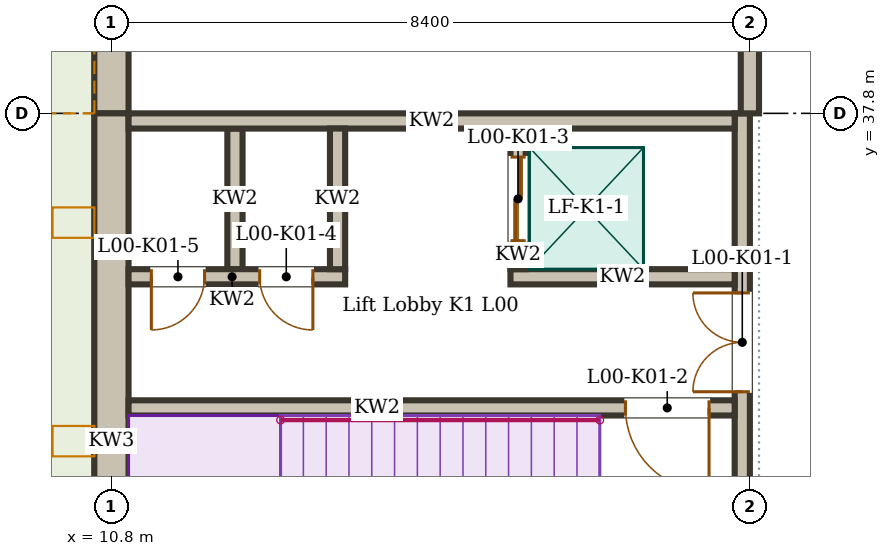
"""IFC4 building model, lengths in metres.
Left out: names, types, materials, properties, quantities, classifications, styles, units other than length and angle.
Written with IfcOpenShell. Run it as: python <this file> out.ifc"""

import sys

from ifc_helpers import new_model, si_unit, direction, frame, frame_2d, origin, place, context, subcontext, project, spatial, rectangle, extrude, element, fill, save


model = new_model("IFC4")
c1 = context("Model", 3, precision=1e-05, world=origin(), true_north=direction((0.0, 1.0)))
c2 = subcontext(c1, "Body", "Model", "MODEL_VIEW")
j1 = project(units=[si_unit("LENGTHUNIT", "METRE"), si_unit("PLANEANGLEUNIT", "RADIAN")], contexts=[c1])
p1 = place(None, origin())
s1 = spatial("IfcSite", under=j1, at=p1, CompositionType="ELEMENT")
p2 = place(p1, origin())
s2 = spatial("IfcBuilding", under=s1, at=p2, CompositionType="ELEMENT")
p3 = place(p2, origin())
s3 = spatial("IfcBuildingStorey", under=s2, at=p3, CompositionType="ELEMENT", Elevation=0.0)
p4 = place(p3, frame((10.8, 37.8, 0.0), z_axis=(0.0, 0.0, 1.0), x_axis=(0.0, 1.0, 0.0)))
e1 = element("IfcWall", 1, at=p4, inside=s3, PredefinedType="SOLIDWALL", context=c2, shape_type="SweptSolid", body=[
    extrude(rectangle(XDim=8.255, YDim=0.45, at=frame_2d((4.127, 0.0))), origin(), (0.0, 0.0, 1.0), 3.85),
])
p5 = place(p4, frame((1.1, 0.0, 2.1)))
e2 = element("IfcOpeningElement", 2, at=p5, cuts=e1, PredefinedType="OPENING", context=c2, shape_type="SweptSolid", body=[
    extrude(rectangle(XDim=0.6, YDim=1.2, at=frame_2d((0.3, 0.6))), frame((0.0, 0.235, 0.0), z_axis=(0.0, -1.0, 0.0), x_axis=(1.0, 0.0, 0.0)), (0.0, 0.0, 1.0), 0.47),
])
p6 = place(p4, frame((3.9, 0.0, 2.1)))
e3 = element("IfcOpeningElement", 3, at=p6, cuts=e1, PredefinedType="OPENING", context=c2, shape_type="SweptSolid", body=[
    extrude(rectangle(XDim=0.6, YDim=1.2, at=frame_2d((0.3, 0.6))), frame((0.0, 0.235, 0.0), z_axis=(0.0, -1.0, 0.0), x_axis=(1.0, 0.0, 0.0)), (0.0, 0.0, 1.0), 0.47),
])
p7 = place(p4, frame((6.7, 0.0, 2.1)))
e4 = element("IfcOpeningElement", 4, at=p7, cuts=e1, PredefinedType="OPENING", context=c2, shape_type="SweptSolid", body=[
    extrude(rectangle(XDim=0.6, YDim=1.2, at=frame_2d((0.3, 0.6))), frame((0.0, 0.235, 0.0), z_axis=(0.0, -1.0, 0.0), x_axis=(1.0, 0.0, 0.0)), (0.0, 0.0, 1.0), 0.47),
])
p8 = place(p3, frame((10.64, 37.8, 3.87), z_axis=(0.0, 0.0, 1.0), x_axis=(0.0, 1.0, 0.0)))
e5 = element("IfcWall", 5, at=p8, inside=s3, PredefinedType="SOLIDWALL", context=c2, shape_type="SweptSolid", body=[
    extrude(rectangle(XDim=8.4, YDim=0.13, at=frame_2d((4.2, 0.0))), origin(), (0.0, 0.0, 1.0), 0.63),
])
p9 = place(p3, frame((19.2, 37.8, 0.0), z_axis=(0.0, 0.0, 1.0), x_axis=(0.0, 1.0, 0.0)))
e6 = element("IfcWall", 6, at=p9, inside=s3, PredefinedType="SOLIDWALL", context=c2, shape_type="SweptSolid", body=[
    extrude(rectangle(XDim=5.48, YDim=0.24, at=frame_2d((2.74, 0.0))), origin(), (0.0, 0.0, 1.0), 3.8),
])
p10 = place(p9, frame((2.2, 0.0, 0.0)))
e7 = element("IfcOpeningElement", 7, at=p10, cuts=e6, PredefinedType="OPENING", context=c2, shape_type="SweptSolid", body=[
    extrude(rectangle(XDim=1.2, YDim=2.1, at=frame_2d((0.6, 1.05))), frame((0.0, 0.13, 0.0), z_axis=(0.0, -1.0, 0.0), x_axis=(1.0, 0.0, 0.0)), (0.0, 0.0, 1.0), 0.26),
])
p11 = place(p3, frame((19.1, 29.625, 0.0), z_axis=(0.0, 0.0, 1.0), x_axis=(0.0, 1.0, 0.0)))
e8 = element("IfcWall", 8, at=p11, inside=s3, PredefinedType="SOLIDWALL", context=c2, shape_type="SweptSolid", body=[
    extrude(rectangle(XDim=8.175, YDim=0.2, at=frame_2d((4.087, 0.0))), origin(), (0.0, 0.0, 1.0), 4.5),
])
p12 = place(p11, frame((4.512, 0.0, 0.0)))
e9 = element("IfcOpeningElement", 9, at=p12, cuts=e8, PredefinedType="OPENING", context=c2, shape_type="SweptSolid", body=[
    extrude(rectangle(XDim=1.3, YDim=2.1, at=frame_2d((0.65, 1.05))), frame((0.0, 0.11, 0.0), z_axis=(0.0, -1.0, 0.0), x_axis=(1.0, 0.0, 0.0)), (0.0, 0.0, 1.0), 0.22),
])
p13 = place(p3, frame((10.8, 29.175, 0.0), z_axis=(0.0, 0.0, 1.0), x_axis=(0.0, 1.0, 0.0)))
e10 = element("IfcWall", 10, at=p13, inside=s3, PredefinedType="SOLIDWALL", context=c2, shape_type="SweptSolid", body=[
    extrude(rectangle(XDim=8.625, YDim=0.45, at=frame_2d((4.312, 0.0))), origin(), (0.0, 0.0, 1.0), 4.5),
])
p14 = place(p3, frame((19.0, 37.7, 0.0), z_axis=(0.0, 0.0, 1.0), x_axis=(-1.0, 0.0, 0.0)))
e11 = element("IfcWall", 11, at=p14, inside=s3, PredefinedType="SOLIDWALL", context=c2, shape_type="SweptSolid", body=[
    extrude(rectangle(XDim=7.975, YDim=0.2, at=frame_2d((3.988, 0.0))), origin(), (0.0, 0.0, 1.0), 4.5),
])
p15 = place(p3, frame((19.0, 33.925, 0.0), z_axis=(0.0, 0.0, 1.0), x_axis=(-1.0, 0.0, 0.0)))
e12 = element("IfcWall", 12, at=p15, inside=s3, PredefinedType="SOLIDWALL", context=c2, shape_type="SweptSolid", body=[
    extrude(rectangle(XDim=7.975, YDim=0.2, at=frame_2d((3.988, 0.0))), origin(), (0.0, 0.0, 1.0), 4.5),
])
p16 = place(p15, frame((0.337, 0.0, 0.0)))
e13 = element("IfcOpeningElement", 13, at=p16, cuts=e12, PredefinedType="OPENING", context=c2, shape_type="SweptSolid", body=[
    extrude(rectangle(XDim=1.1, YDim=2.1, at=frame_2d((0.55, 1.05))), frame((0.0, 0.11, 0.0), z_axis=(0.0, -1.0, 0.0), x_axis=(1.0, 0.0, 0.0)), (0.0, 0.0, 1.0), 0.22),
])
p17 = place(p3, frame((19.0, 35.65, 0.0), z_axis=(0.0, 0.0, 1.0), x_axis=(-1.0, 0.0, 0.0)))
e14 = element("IfcWall", 14, at=p17, inside=s3, PredefinedType="SOLIDWALL", context=c2, shape_type="SweptSolid", body=[
    extrude(rectangle(XDim=2.95, YDim=0.2, at=frame_2d((1.475, 0.0))), origin(), (0.0, 0.0, 1.0), 4.5),
])
p18 = place(p3, frame((13.875, 35.65, 0.0), z_axis=(0.0, 0.0, 1.0), x_axis=(-1.0, 0.0, 0.0)))
e15 = element("IfcWall", 15, at=p18, inside=s3, PredefinedType="SOLIDWALL", context=c2, shape_type="SweptSolid", body=[
    extrude(rectangle(XDim=2.85, YDim=0.2, at=frame_2d((1.425, 0.0))), origin(), (0.0, 0.0, 1.0), 4.35),
])
p19 = place(p18, frame((0.425, 0.0, 0.0)))
e16 = element("IfcOpeningElement", 16, at=p19, cuts=e15, PredefinedType="OPENING", context=c2, shape_type="SweptSolid", body=[
    extrude(rectangle(XDim=0.7, YDim=2.1, at=frame_2d((0.35, 1.05))), frame((0.0, 0.11, 0.0), z_axis=(0.0, -1.0, 0.0), x_axis=(1.0, 0.0, 0.0)), (0.0, 0.0, 1.0), 0.22),
])
p20 = place(p18, frame((1.85, 0.0, 0.0)))
e17 = element("IfcOpeningElement", 17, at=p20, cuts=e15, PredefinedType="OPENING", context=c2, shape_type="SweptSolid", body=[
    extrude(rectangle(XDim=0.7, YDim=2.1, at=frame_2d((0.35, 1.05))), frame((0.0, 0.11, 0.0), z_axis=(0.0, -1.0, 0.0), x_axis=(1.0, 0.0, 0.0)), (0.0, 0.0, 1.0), 0.22),
])
p21 = place(p3, frame((16.15, 35.75, 0.0), z_axis=(0.0, 0.0, 1.0), x_axis=(0.0, 1.0, 0.0)))
e18 = element("IfcWall", 18, at=p21, inside=s3, PredefinedType="SOLIDWALL", context=c2, shape_type="SweptSolid", body=[
    extrude(rectangle(XDim=1.85, YDim=0.2, at=frame_2d((0.925, 0.0))), origin(), (0.0, 0.0, 1.0), 4.5),
])
p22 = place(p21, frame((0.375, 0.0, 0.0)))
e19 = element("IfcOpeningElement", 19, at=p22, cuts=e18, PredefinedType="OPENING", context=c2, shape_type="SweptSolid", body=[
    extrude(rectangle(XDim=1.1, YDim=2.1, at=frame_2d((0.55, 1.05))), frame((0.0, 0.11, 0.0), z_axis=(0.0, -1.0, 0.0), x_axis=(1.0, 0.0, 0.0)), (0.0, 0.0, 1.0), 0.22),
])
for number, where, z_axis, x_axis in (
    (20, (13.775, 35.75, 0.0), (0.0, 0.0, 1.0), (0.0, 1.0, 0.0)),
    (21, (12.425, 35.75, 0.0), (0.0, 0.0, 1.0), (0.0, 1.0, 0.0)),
):
    element("IfcWall", number, at=place(p3, frame(where, z_axis=z_axis, x_axis=x_axis)), inside=s3, PredefinedType="SOLIDWALL", context=c2, shape_type="SweptSolid", body=[
        extrude(rectangle(XDim=1.85, YDim=0.2, at=frame_2d((0.925, 0.0))), origin(), (0.0, 0.0, 1.0), 4.35),
    ])
p23 = place(p12, origin())
e22 = element("IfcDoor", 22, at=p23, inside=s3, OperationType="DOUBLE_DOOR_DOUBLE_SWING", PredefinedType="DOOR", context=c2, shape_type="SweptSolid", body=[
    extrude(rectangle(XDim=1.3, YDim=2.1, at=frame_2d((0.65, 1.05))), frame((0.0, 0.025, 0.0), z_axis=(0.0, -1.0, 0.0), x_axis=(1.0, 0.0, 0.0)), (0.0, 0.0, 1.0), 0.05),
])
fill(e9, e22)
p24 = place(p16, origin())
e23 = element("IfcDoor", 23, at=p24, inside=s3, OperationType="SINGLE_SWING_LEFT", PredefinedType="DOOR", context=c2, shape_type="SweptSolid", body=[
    extrude(rectangle(XDim=1.1, YDim=2.1, at=frame_2d((0.55, 1.05))), frame((0.0, 0.025, 0.0), z_axis=(0.0, -1.0, 0.0), x_axis=(1.0, 0.0, 0.0)), (0.0, 0.0, 1.0), 0.05),
])
fill(e13, e23)
p25 = place(p22, origin())
e24 = element("IfcDoor", 24, at=p25, inside=s3, OperationType="DOUBLE_DOOR_SLIDING", PredefinedType="DOOR", context=c2, shape_type="SweptSolid", body=[
    extrude(rectangle(XDim=1.1, YDim=2.1, at=frame_2d((0.55, 1.05))), frame((0.0, 0.025, 0.0), z_axis=(0.0, -1.0, 0.0), x_axis=(1.0, 0.0, 0.0)), (0.0, 0.0, 1.0), 0.05),
])
fill(e19, e24)
p26 = place(p19, origin())
e25 = element("IfcDoor", 25, at=p26, inside=s3, OperationType="SINGLE_SWING_LEFT", PredefinedType="DOOR", context=c2, shape_type="SweptSolid", body=[
    extrude(rectangle(XDim=0.7, YDim=2.1, at=frame_2d((0.35, 1.05))), frame((0.0, 0.025, 0.0), z_axis=(0.0, -1.0, 0.0), x_axis=(1.0, 0.0, 0.0)), (0.0, 0.0, 1.0), 0.05),
])
fill(e16, e25)
p27 = place(p20, origin())
e26 = element("IfcDoor", 26, at=p27, inside=s3, OperationType="SINGLE_SWING_RIGHT", PredefinedType="DOOR", context=c2, shape_type="SweptSolid", body=[
    extrude(rectangle(XDim=0.7, YDim=2.1, at=frame_2d((0.35, 1.05))), frame((0.0, 0.025, 0.0), z_axis=(0.0, -1.0, 0.0), x_axis=(1.0, 0.0, 0.0)), (0.0, 0.0, 1.0), 0.05),
])
fill(e17, e26)
save(model, sys.argv[1])
